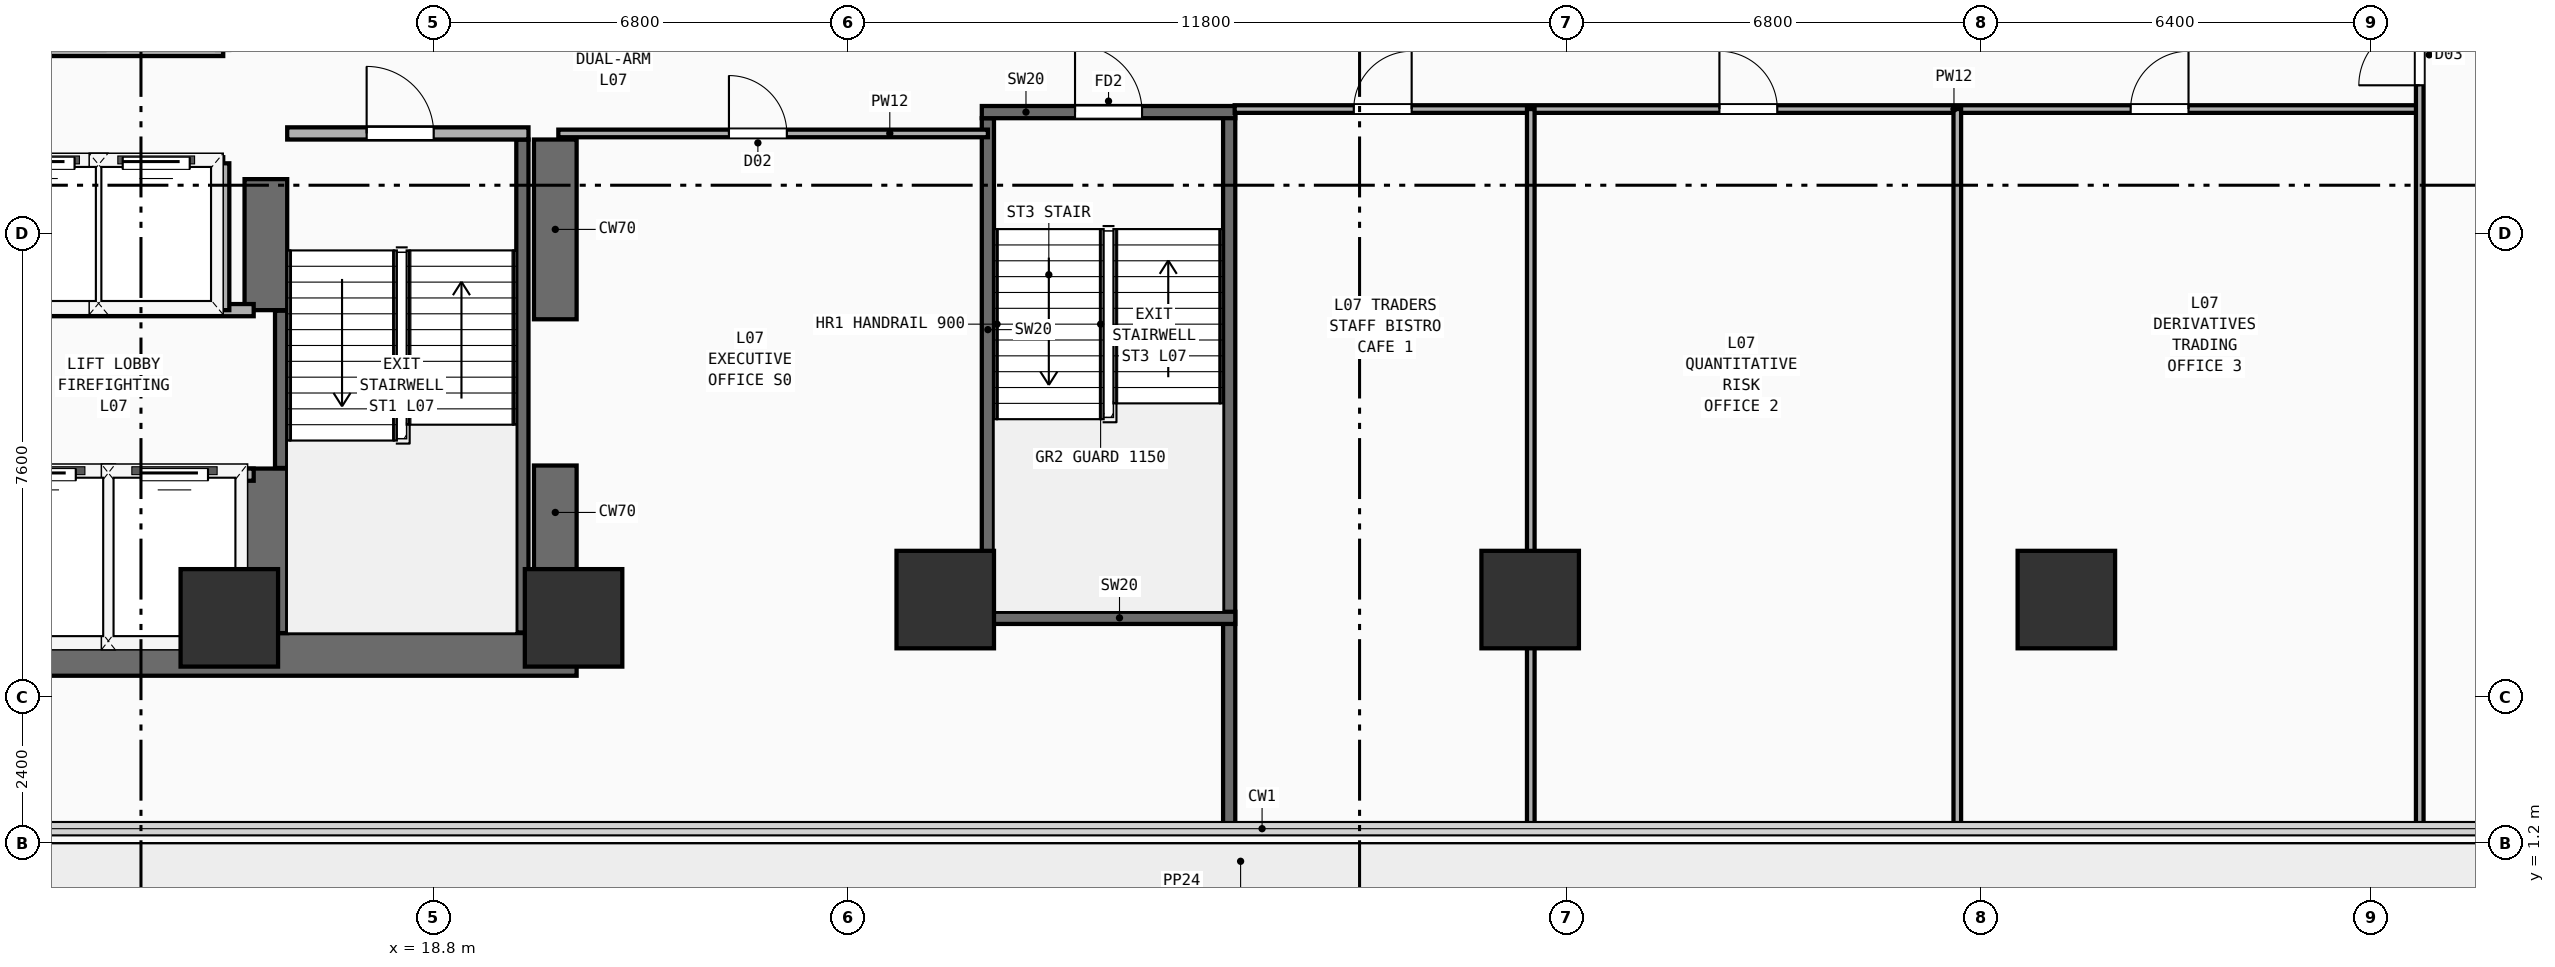
"""IFC4 building model, lengths in metres.
Left out: names, types, materials, properties, quantities, classifications, styles, units other than length and angle.
Written with IfcOpenShell. Run it as: python <this file> out.ifc"""

import sys

from ifc_helpers import new_model, si_unit, direction, frame, frame_2d, origin, origin_2d, place, context, subcontext, project, spatial, rectangle, extrude, element, fill, save


model = new_model("IFC4")
c1 = context("Model", 3, precision=1e-05, world=origin(), true_north=direction((0.0, 1.0)))
c2 = subcontext(c1, "Body", "Model", "MODEL_VIEW")
j1 = project(units=[si_unit("LENGTHUNIT", "METRE"), si_unit("PLANEANGLEUNIT", "RADIAN")], contexts=[c1])
p1 = place(None, origin())
s1 = spatial("IfcSite", under=j1, at=p1, CompositionType="ELEMENT")
p2 = place(p1, origin())
s2 = spatial("IfcBuilding", under=s1, at=p2, CompositionType="ELEMENT")
p3 = place(p2, frame((0.0, 0.0, 29.6)))
s3 = spatial("IfcBuildingStorey", under=s2, at=p3, CompositionType="ELEMENT", Elevation=29.6)
p4 = place(p3, frame((7.1, 4.3, 0.0), z_axis=(0.0, 0.0, 1.0), x_axis=(1.0, 0.0, 0.0)))
e1 = element("IfcWall", 1, at=p4, inside=s3, PredefinedType="SHEAR", context=c2, shape_type="SweptSolid", body=[
    extrude(rectangle(XDim=14.05, YDim=0.7, at=frame_2d((7.025, 0.0))), origin(), (0.0, 0.0, 1.0), 3.54),
])
p5 = place(p3, frame((20.8, 4.65, 0.0), z_axis=(0.0, 0.0, 1.0), x_axis=(0.0, 1.0, 0.0)))
e2 = element("IfcWall", 2, at=p5, inside=s3, PredefinedType="SHEAR", context=c2, shape_type="SweptSolid", body=[
    extrude(rectangle(XDim=2.75, YDim=0.7, at=frame_2d((1.375, 0.0))), origin(), (0.0, 0.0, 1.0), 3.54),
])
p6 = place(p3, frame((20.8, 9.8, 0.0), z_axis=(0.0, 0.0, 1.0), x_axis=(0.0, 1.0, 0.0)))
e3 = element("IfcWall", 3, at=p6, inside=s3, PredefinedType="SHEAR", context=c2, shape_type="SweptSolid", body=[
    extrude(rectangle(XDim=2.95, YDim=0.7, at=frame_2d((1.475, 0.0))), origin(), (0.0, 0.0, 1.0), 3.54),
])
p7 = place(p3, frame((16.05, 4.65, 0.0), z_axis=(0.0, 0.0, 1.0), x_axis=(0.0, 1.0, 0.0)))
e4 = element("IfcWall", 4, at=p7, inside=s3, PredefinedType="SHEAR", context=c2, shape_type="SweptSolid", body=[
    extrude(rectangle(XDim=2.7, YDim=0.7, at=frame_2d((1.35, 0.0))), origin(), (0.0, 0.0, 1.0), 3.54),
])
p8 = place(p3, frame((16.05, 9.95, 0.0), z_axis=(0.0, 0.0, 1.0), x_axis=(0.0, 1.0, 0.0)))
e5 = element("IfcWall", 5, at=p8, inside=s3, PredefinedType="SHEAR", context=c2, shape_type="SweptSolid", body=[
    extrude(rectangle(XDim=2.15, YDim=0.7, at=frame_2d((1.075, 0.0))), origin(), (0.0, 0.0, 1.0), 3.54),
])
for number, where, z_axis, x_axis in (
    (6, (15.45, 4.9, 0.0), (0.0, 0.0, 1.0), (1.0, 0.0, 0.0)),
    (7, (21.1, 4.9, 0.0), (0.0, 0.0, 1.0), (1.0, 0.0, 0.0)),
    (8, (27.2, 5.2, 0.0), (0.0, 0.0, 1.0), (1.0, 0.0, 0.0)),
    (9, (36.8, 5.2, 0.0), (0.0, 0.0, 1.0), (1.0, 0.0, 0.0)),
    (10, (45.6, 5.2, 0.0), (0.0, 0.0, 1.0), (1.0, 0.0, 0.0)),
):
    element("IfcColumn", number, at=place(p3, frame(where, z_axis=z_axis, x_axis=x_axis)), inside=s3, PredefinedType="COLUMN", context=c2, shape_type="SweptSolid", body=[
        extrude(rectangle(XDim=1.6, YDim=1.6, at=origin_2d()), origin(), (0.0, 0.0, 1.0), 3.54),
    ])
p9 = place(p3, frame((16.3, 7.36, 0.0), z_axis=(0.0, 0.0, 1.0), x_axis=(0.0, 1.0, 0.0)))
e11 = element("IfcWall", 11, at=p9, inside=s3, PredefinedType="SHEAR", context=c2, shape_type="SweptSolid", body=[
    extrude(rectangle(XDim=2.58, YDim=0.2, at=frame_2d((1.29, 0.0))), origin(), (0.0, 0.0, 1.0), 3.54),
])
p10 = place(p3, frame((20.26, 4.66, 0.0), z_axis=(0.0, 0.0, 1.0), x_axis=(0.0, 1.0, 0.0)))
e12 = element("IfcWall", 12, at=p10, inside=s3, PredefinedType="SHEAR", context=c2, shape_type="SweptSolid", body=[
    extrude(rectangle(XDim=8.09, YDim=0.2, at=frame_2d((4.045, 0.0))), origin(), (0.0, 0.0, 1.0), 3.54),
])
p11 = place(p3, frame((16.4, 12.85, 0.0), z_axis=(0.0, 0.0, 1.0), x_axis=(1.0, 0.0, 0.0)))
e13 = element("IfcWall", 13, at=p11, inside=s3, PredefinedType="PARTITIONING", context=c2, shape_type="SweptSolid", body=[
    extrude(rectangle(XDim=3.96, YDim=0.2, at=frame_2d((1.98, 0.0))), origin(), (0.0, 0.0, 1.0), 3.54),
])
p12 = place(p11, frame((1.304, 0.0, 0.0)))
e14 = element("IfcOpeningElement", 14, at=p12, cuts=e13, PredefinedType="OPENING", context=c2, shape_type="SweptSolid", body=[
    extrude(rectangle(XDim=1.1, YDim=2.2, at=frame_2d((0.55, 1.1))), frame((0.0, 0.11, 0.0), z_axis=(0.0, -1.0, 0.0), x_axis=(1.0, 0.0, 0.0)), (0.0, 0.0, 1.0), 0.22),
])
p13 = place(p3, frame((27.9, 5.0, 0.0), z_axis=(0.0, 0.0, 1.0), x_axis=(0.0, 1.0, 0.0)))
e15 = element("IfcWall", 15, at=p13, inside=s3, PredefinedType="SHEAR", context=c2, shape_type="SweptSolid", body=[
    extrude(rectangle(XDim=8.1, YDim=0.2, at=frame_2d((4.05, 0.0))), origin(), (0.0, 0.0, 1.0), 3.54),
])
p14 = place(p3, frame((31.86, 1.44, 0.0), z_axis=(0.0, 0.0, 1.0), x_axis=(0.0, 1.0, 0.0)))
e16 = element("IfcWall", 16, at=p14, inside=s3, PredefinedType="SHEAR", context=c2, shape_type="SweptSolid", body=[
    extrude(rectangle(XDim=11.81, YDim=0.2, at=frame_2d((5.905, 0.0))), origin(), (0.0, 0.0, 1.0), 3.54),
])
p15 = place(p3, frame((27.8, 4.9, 0.0), z_axis=(0.0, 0.0, 1.0), x_axis=(1.0, 0.0, 0.0)))
e17 = element("IfcWall", 17, at=p15, inside=s3, PredefinedType="SHEAR", context=c2, shape_type="SweptSolid", body=[
    extrude(rectangle(XDim=4.16, YDim=0.2, at=frame_2d((2.08, 0.0))), origin(), (0.0, 0.0, 1.0), 3.54),
])
p16 = place(p3, frame((27.8, 13.2, 0.0), z_axis=(0.0, 0.0, 1.0), x_axis=(1.0, 0.0, 0.0)))
e18 = element("IfcWall", 18, at=p16, inside=s3, PredefinedType="SHEAR", context=c2, shape_type="SweptSolid", body=[
    extrude(rectangle(XDim=4.16, YDim=0.2, at=frame_2d((2.08, 0.0))), origin(), (0.0, 0.0, 1.0), 3.54),
])
p17 = place(p16, frame((1.53, 0.0, 0.0)))
e19 = element("IfcOpeningElement", 19, at=p17, cuts=e18, PredefinedType="OPENING", context=c2, shape_type="SweptSolid", body=[
    extrude(rectangle(XDim=1.1, YDim=2.2, at=frame_2d((0.55, 1.1))), frame((0.0, 0.11, 0.0), z_axis=(0.0, -1.0, 0.0), x_axis=(1.0, 0.0, 0.0)), (0.0, 0.0, 1.0), 0.22),
])
p18 = place(p3, frame((7.5, 7.25, 0.0), z_axis=(0.0, 0.0, 1.0), x_axis=(1.0, 0.0, 0.0)))
e20 = element("IfcWall", 20, at=p18, inside=s3, PredefinedType="PARTITIONING", context=c2, shape_type="SweptSolid", body=[
    extrude(rectangle(XDim=8.35, YDim=0.2, at=frame_2d((4.175, 0.0))), origin(), (0.0, 0.0, 1.0), 3.54),
])
p19 = place(p18, frame((0.53, 0.0, 0.0)))
e21 = element("IfcOpeningElement", 21, at=p19, cuts=e20, PredefinedType="OPENING", context=c2, shape_type="SweptSolid", body=[
    extrude(rectangle(XDim=1.1, YDim=2.2, at=frame_2d((0.55, 1.1))), frame((0.0, 0.11, 0.0), z_axis=(0.0, -1.0, 0.0), x_axis=(1.0, 0.0, 0.0)), (0.0, 0.0, 1.0), 0.22),
])
p20 = place(p18, frame((2.37, 0.0, 0.0)))
e22 = element("IfcOpeningElement", 22, at=p20, cuts=e20, PredefinedType="OPENING", context=c2, shape_type="SweptSolid", body=[
    extrude(rectangle(XDim=1.1, YDim=2.2, at=frame_2d((0.55, 1.1))), frame((0.0, 0.11, 0.0), z_axis=(0.0, -1.0, 0.0), x_axis=(1.0, 0.0, 0.0)), (0.0, 0.0, 1.0), 0.22),
])
p21 = place(p18, frame((4.33, 0.0, 0.0)))
e23 = element("IfcOpeningElement", 23, at=p21, cuts=e20, PredefinedType="OPENING", context=c2, shape_type="SweptSolid", body=[
    extrude(rectangle(XDim=1.1, YDim=2.2, at=frame_2d((0.55, 1.1))), frame((0.0, 0.11, 0.0), z_axis=(0.0, -1.0, 0.0), x_axis=(1.0, 0.0, 0.0)), (0.0, 0.0, 1.0), 0.22),
])
p22 = place(p18, frame((6.5, 0.0, 0.0)))
e24 = element("IfcOpeningElement", 24, at=p22, cuts=e20, PredefinedType="OPENING", context=c2, shape_type="SweptSolid", body=[
    extrude(rectangle(XDim=1.1, YDim=2.2, at=frame_2d((0.55, 1.1))), frame((0.0, 0.11, 0.0), z_axis=(0.0, -1.0, 0.0), x_axis=(1.0, 0.0, 0.0)), (0.0, 0.0, 1.0), 0.22),
])
p23 = place(p3, frame((7.5, 9.95, 0.0), z_axis=(0.0, 0.0, 1.0), x_axis=(1.0, 0.0, 0.0)))
e25 = element("IfcWall", 25, at=p23, inside=s3, PredefinedType="PARTITIONING", context=c2, shape_type="SweptSolid", body=[
    extrude(rectangle(XDim=8.35, YDim=0.2, at=frame_2d((4.175, 0.0))), origin(), (0.0, 0.0, 1.0), 3.54),
])
p24 = place(p3, frame((13.46, 4.45, 0.0), z_axis=(0.0, 0.0, 1.0), x_axis=(0.0, 1.0, 0.0)))
e26 = element("IfcWall", 26, at=p24, inside=s3, PredefinedType="PARTITIONING", context=c2, shape_type="SweptSolid", body=[
    extrude(rectangle(XDim=2.8, YDim=0.2, at=frame_2d((1.4, 0.0))), origin(), (0.0, 0.0, 1.0), 3.54),
])
p25 = place(p3, frame((7.5, 12.36, 0.0), z_axis=(0.0, 0.0, 1.0), x_axis=(1.0, 0.0, 0.0)))
e27 = element("IfcWall", 27, at=p25, inside=s3, PredefinedType="PARTITIONING", context=c2, shape_type="SweptSolid", body=[
    extrude(rectangle(XDim=7.85, YDim=0.2, at=frame_2d((3.925, 0.0))), origin(), (0.0, 0.0, 1.0), 3.54),
])
p26 = place(p25, frame((0.53, 0.0, 0.0)))
e28 = element("IfcOpeningElement", 28, at=p26, cuts=e27, PredefinedType="OPENING", context=c2, shape_type="SweptSolid", body=[
    extrude(rectangle(XDim=1.1, YDim=2.2, at=frame_2d((0.55, 1.1))), frame((0.0, 0.11, 0.0), z_axis=(0.0, -1.0, 0.0), x_axis=(1.0, 0.0, 0.0)), (0.0, 0.0, 1.0), 0.22),
])
p27 = place(p25, frame((2.42, 0.0, 0.0)))
e29 = element("IfcOpeningElement", 29, at=p27, cuts=e27, PredefinedType="OPENING", context=c2, shape_type="SweptSolid", body=[
    extrude(rectangle(XDim=1.1, YDim=2.2, at=frame_2d((0.55, 1.1))), frame((0.0, 0.11, 0.0), z_axis=(0.0, -1.0, 0.0), x_axis=(1.0, 0.0, 0.0)), (0.0, 0.0, 1.0), 0.22),
])
p28 = place(p25, frame((4.31, 0.0, 0.0)))
e30 = element("IfcOpeningElement", 30, at=p28, cuts=e27, PredefinedType="OPENING", context=c2, shape_type="SweptSolid", body=[
    extrude(rectangle(XDim=1.1, YDim=2.2, at=frame_2d((0.55, 1.1))), frame((0.0, 0.11, 0.0), z_axis=(0.0, -1.0, 0.0), x_axis=(1.0, 0.0, 0.0)), (0.0, 0.0, 1.0), 0.22),
])
p29 = place(p25, frame((6.2, 0.0, 0.0)))
e31 = element("IfcOpeningElement", 31, at=p29, cuts=e27, PredefinedType="OPENING", context=c2, shape_type="SweptSolid", body=[
    extrude(rectangle(XDim=1.1, YDim=2.2, at=frame_2d((0.55, 1.1))), frame((0.0, 0.11, 0.0), z_axis=(0.0, -1.0, 0.0), x_axis=(1.0, 0.0, 0.0)), (0.0, 0.0, 1.0), 0.22),
])
for number, where, z_axis, x_axis in (
    (32, (15.35, 9.95, 0.0), (0.0, 0.0, 1.0), (0.0, 1.0, 0.0)),
    (33, (13.3, 9.95, 0.0), (0.0, 0.0, 1.0), (0.0, 1.0, 0.0)),
):
    element("IfcWall", number, at=place(p3, frame(where, z_axis=z_axis, x_axis=x_axis)), inside=s3, PredefinedType="PARTITIONING", context=c2, shape_type="SweptSolid", body=[
        extrude(rectangle(XDim=2.41, YDim=0.2, at=frame_2d((1.205, 0.0))), origin(), (0.0, 0.0, 1.0), 3.54),
    ])
p30 = place(p3, frame((7.5, 14.22, 0.0), z_axis=(0.0, 0.0, 1.0), x_axis=(1.0, 0.0, 0.0)))
e34 = element("IfcWall", 34, at=p30, inside=s3, PredefinedType="PARTITIONING", context=c2, shape_type="SweptSolid", body=[
    extrude(rectangle(XDim=7.85, YDim=0.2, at=frame_2d((3.925, 0.0))), origin(), (0.0, 0.0, 1.0), 3.54),
])
p31 = place(p3, frame((20.85, 12.85, 0.0), z_axis=(0.0, 0.0, 1.0), x_axis=(1.0, 0.0, 0.0)))
e35 = element("IfcWall", 35, at=p31, inside=s3, PredefinedType="PARTITIONING", context=c2, shape_type="SweptSolid", body=[
    extrude(rectangle(XDim=7.05, YDim=0.125, at=frame_2d((3.525, 0.0))), origin(), (0.0, 0.0, 1.0), 3.54),
])
p32 = place(p31, frame((2.8, 0.0, 0.0)))
e36 = element("IfcOpeningElement", 36, at=p32, cuts=e35, PredefinedType="OPENING", context=c2, shape_type="SweptSolid", body=[
    extrude(rectangle(XDim=0.95, YDim=2.15, at=frame_2d((0.475, 1.075))), frame((0.0, 0.073, 0.0), z_axis=(0.0, -1.0, 0.0), x_axis=(1.0, 0.0, 0.0)), (0.0, 0.0, 1.0), 0.145),
])
p33 = place(p3, frame((31.95, 13.25, 0.0), z_axis=(0.0, 0.0, 1.0), x_axis=(1.0, 0.0, 0.0)))
e37 = element("IfcWall", 37, at=p33, inside=s3, PredefinedType="PARTITIONING", context=c2, shape_type="SweptSolid", body=[
    extrude(rectangle(XDim=19.45, YDim=0.125, at=frame_2d((9.725, 0.0))), origin(), (0.0, 0.0, 1.0), 3.04),
])
p34 = place(p33, frame((1.955, 0.0, 0.0)))
e38 = element("IfcOpeningElement", 38, at=p34, cuts=e37, PredefinedType="OPENING", context=c2, shape_type="SweptSolid", body=[
    extrude(rectangle(XDim=0.95, YDim=2.15, at=frame_2d((0.475, 1.075))), frame((0.0, 0.073, 0.0), z_axis=(0.0, -1.0, 0.0), x_axis=(1.0, 0.0, 0.0)), (0.0, 0.0, 1.0), 0.145),
])
p35 = place(p33, frame((7.956, 0.0, 0.0)))
e39 = element("IfcOpeningElement", 39, at=p35, cuts=e37, PredefinedType="OPENING", context=c2, shape_type="SweptSolid", body=[
    extrude(rectangle(XDim=0.95, YDim=2.15, at=frame_2d((0.475, 1.075))), frame((0.0, 0.073, 0.0), z_axis=(0.0, -1.0, 0.0), x_axis=(1.0, 0.0, 0.0)), (0.0, 0.0, 1.0), 0.145),
])
p36 = place(p33, frame((14.705, 0.0, 0.0)))
e40 = element("IfcOpeningElement", 40, at=p36, cuts=e37, PredefinedType="OPENING", context=c2, shape_type="SweptSolid", body=[
    extrude(rectangle(XDim=0.95, YDim=2.15, at=frame_2d((0.475, 1.075))), frame((0.0, 0.073, 0.0), z_axis=(0.0, -1.0, 0.0), x_axis=(1.0, 0.0, 0.0)), (0.0, 0.0, 1.0), 0.145),
])
p37 = place(p3, frame((36.81, 1.44, 0.0), z_axis=(0.0, 0.0, 1.0), x_axis=(0.0, 1.0, 0.0)))
e41 = element("IfcWall", 41, at=p37, inside=s3, PredefinedType="PARTITIONING", context=c2, shape_type="SweptSolid", body=[
    extrude(rectangle(XDim=11.81, YDim=0.125, at=frame_2d((5.905, 0.0))), origin(), (0.0, 0.0, 1.0), 2.63),
])
p38 = place(p3, frame((43.81, 1.44, 0.0), z_axis=(0.0, 0.0, 1.0), x_axis=(0.0, 1.0, 0.0)))
e42 = element("IfcWall", 42, at=p38, inside=s3, PredefinedType="PARTITIONING", context=c2, shape_type="SweptSolid", body=[
    extrude(rectangle(XDim=11.81, YDim=0.125, at=frame_2d((5.905, 0.0))), origin(), (0.0, 0.0, 1.0), 3.54),
])
p39 = place(p3, frame((51.4, 1.44, 0.0), z_axis=(0.0, 0.0, 1.0), x_axis=(0.0, 1.0, 0.0)))
e43 = element("IfcWall", 43, at=p39, inside=s3, PredefinedType="PARTITIONING", context=c2, shape_type="SweptSolid", body=[
    extrude(rectangle(XDim=22.12, YDim=0.125, at=frame_2d((11.06, 0.0))), origin(), (0.0, 0.0, 1.0), 3.54),
])
p40 = place(p39, frame((12.2, 0.0, 0.0)))
e44 = element("IfcOpeningElement", 44, at=p40, cuts=e43, PredefinedType="OPENING", context=c2, shape_type="SweptSolid", body=[
    extrude(rectangle(XDim=1.0, YDim=2.2, at=frame_2d((0.5, 1.1))), frame((0.0, 0.073, 0.0), z_axis=(0.0, -1.0, 0.0), x_axis=(1.0, 0.0, 0.0)), (0.0, 0.0, 1.0), 0.145),
])
p41 = place(p12, frame((1.1, 0.0, 0.0), z_axis=(0.0, 0.0, 1.0), x_axis=(-1.0, 0.0, 0.0)))
e45 = element("IfcDoor", 45, at=p41, inside=s3, OperationType="SINGLE_SWING_RIGHT", PredefinedType="DOOR", context=c2, shape_type="SweptSolid", body=[
    extrude(rectangle(XDim=1.1, YDim=2.2, at=frame_2d((0.55, 1.1))), frame((0.0, 0.025, 0.0), z_axis=(0.0, -1.0, 0.0), x_axis=(1.0, 0.0, 0.0)), (0.0, 0.0, 1.0), 0.05),
])
fill(e14, e45)
p42 = place(p17, frame((1.1, 0.0, 0.0), z_axis=(0.0, 0.0, 1.0), x_axis=(-1.0, 0.0, 0.0)))
e46 = element("IfcDoor", 46, at=p42, inside=s3, OperationType="SINGLE_SWING_RIGHT", PredefinedType="DOOR", context=c2, shape_type="SweptSolid", body=[
    extrude(rectangle(XDim=1.1, YDim=2.2, at=frame_2d((0.55, 1.1))), frame((0.0, 0.025, 0.0), z_axis=(0.0, -1.0, 0.0), x_axis=(1.0, 0.0, 0.0)), (0.0, 0.0, 1.0), 0.05),
])
fill(e19, e46)
p43 = place(p21, origin())
e47 = element("IfcDoor", 47, at=p43, inside=s3, OperationType="SLIDING_TO_LEFT", PredefinedType="DOOR", context=c2, shape_type="SweptSolid", body=[
    extrude(rectangle(XDim=1.1, YDim=2.2, at=frame_2d((0.55, 1.1))), frame((0.0, 0.025, 0.0), z_axis=(0.0, -1.0, 0.0), x_axis=(1.0, 0.0, 0.0)), (0.0, 0.0, 1.0), 0.05),
])
fill(e23, e47)
p44 = place(p22, origin())
e48 = element("IfcDoor", 48, at=p44, inside=s3, OperationType="SLIDING_TO_LEFT", PredefinedType="DOOR", context=c2, shape_type="SweptSolid", body=[
    extrude(rectangle(XDim=1.1, YDim=2.2, at=frame_2d((0.55, 1.1))), frame((0.0, 0.025, 0.0), z_axis=(0.0, -1.0, 0.0), x_axis=(1.0, 0.0, 0.0)), (0.0, 0.0, 1.0), 0.05),
])
fill(e24, e48)
p45 = place(p28, origin())
e49 = element("IfcDoor", 49, at=p45, inside=s3, OperationType="SLIDING_TO_LEFT", PredefinedType="DOOR", context=c2, shape_type="SweptSolid", body=[
    extrude(rectangle(XDim=1.1, YDim=2.2, at=frame_2d((0.55, 1.1))), frame((0.0, 0.025, 0.0), z_axis=(0.0, -1.0, 0.0), x_axis=(1.0, 0.0, 0.0)), (0.0, 0.0, 1.0), 0.05),
])
fill(e30, e49)
p46 = place(p29, origin())
e50 = element("IfcDoor", 50, at=p46, inside=s3, OperationType="SLIDING_TO_LEFT", PredefinedType="DOOR", context=c2, shape_type="SweptSolid", body=[
    extrude(rectangle(XDim=1.1, YDim=2.2, at=frame_2d((0.55, 1.1))), frame((0.0, 0.025, 0.0), z_axis=(0.0, -1.0, 0.0), x_axis=(1.0, 0.0, 0.0)), (0.0, 0.0, 1.0), 0.05),
])
fill(e31, e50)
p47 = place(p32, origin())
e51 = element("IfcDoor", 51, at=p47, inside=s3, OperationType="SINGLE_SWING_LEFT", PredefinedType="DOOR", context=c2, shape_type="SweptSolid", body=[
    extrude(rectangle(XDim=0.95, YDim=2.15, at=frame_2d((0.475, 1.075))), frame((0.0, 0.025, 0.0), z_axis=(0.0, -1.0, 0.0), x_axis=(1.0, 0.0, 0.0)), (0.0, 0.0, 1.0), 0.05),
])
fill(e36, e51)
p48 = place(p34, origin())
e52 = element("IfcDoor", 52, at=p48, inside=s3, OperationType="SINGLE_SWING_RIGHT", PredefinedType="DOOR", context=c2, shape_type="SweptSolid", body=[
    extrude(rectangle(XDim=0.95, YDim=2.15, at=frame_2d((0.475, 1.075))), frame((0.0, 0.025, 0.0), z_axis=(0.0, -1.0, 0.0), x_axis=(1.0, 0.0, 0.0)), (0.0, 0.0, 1.0), 0.05),
])
fill(e38, e52)
p49 = place(p35, origin())
e53 = element("IfcDoor", 53, at=p49, inside=s3, OperationType="SINGLE_SWING_LEFT", PredefinedType="DOOR", context=c2, shape_type="SweptSolid", body=[
    extrude(rectangle(XDim=0.95, YDim=2.15, at=frame_2d((0.475, 1.075))), frame((0.0, 0.025, 0.0), z_axis=(0.0, -1.0, 0.0), x_axis=(1.0, 0.0, 0.0)), (0.0, 0.0, 1.0), 0.05),
])
fill(e39, e53)
p50 = place(p36, origin())
e54 = element("IfcDoor", 54, at=p50, inside=s3, OperationType="SINGLE_SWING_RIGHT", PredefinedType="DOOR", context=c2, shape_type="SweptSolid", body=[
    extrude(rectangle(XDim=0.95, YDim=2.15, at=frame_2d((0.475, 1.075))), frame((0.0, 0.025, 0.0), z_axis=(0.0, -1.0, 0.0), x_axis=(1.0, 0.0, 0.0)), (0.0, 0.0, 1.0), 0.05),
])
fill(e40, e54)
p51 = place(p40, origin())
e55 = element("IfcDoor", 55, at=p51, inside=s3, OperationType="SINGLE_SWING_LEFT", PredefinedType="DOOR", context=c2, shape_type="SweptSolid", body=[
    extrude(rectangle(XDim=1.0, YDim=2.2, at=frame_2d((0.5, 1.1))), frame((0.0, 0.025, 0.0), z_axis=(0.0, -1.0, 0.0), x_axis=(1.0, 0.0, 0.0)), (0.0, 0.0, 1.0), 0.05),
])
fill(e44, e55)
save(model, sys.argv[1])
